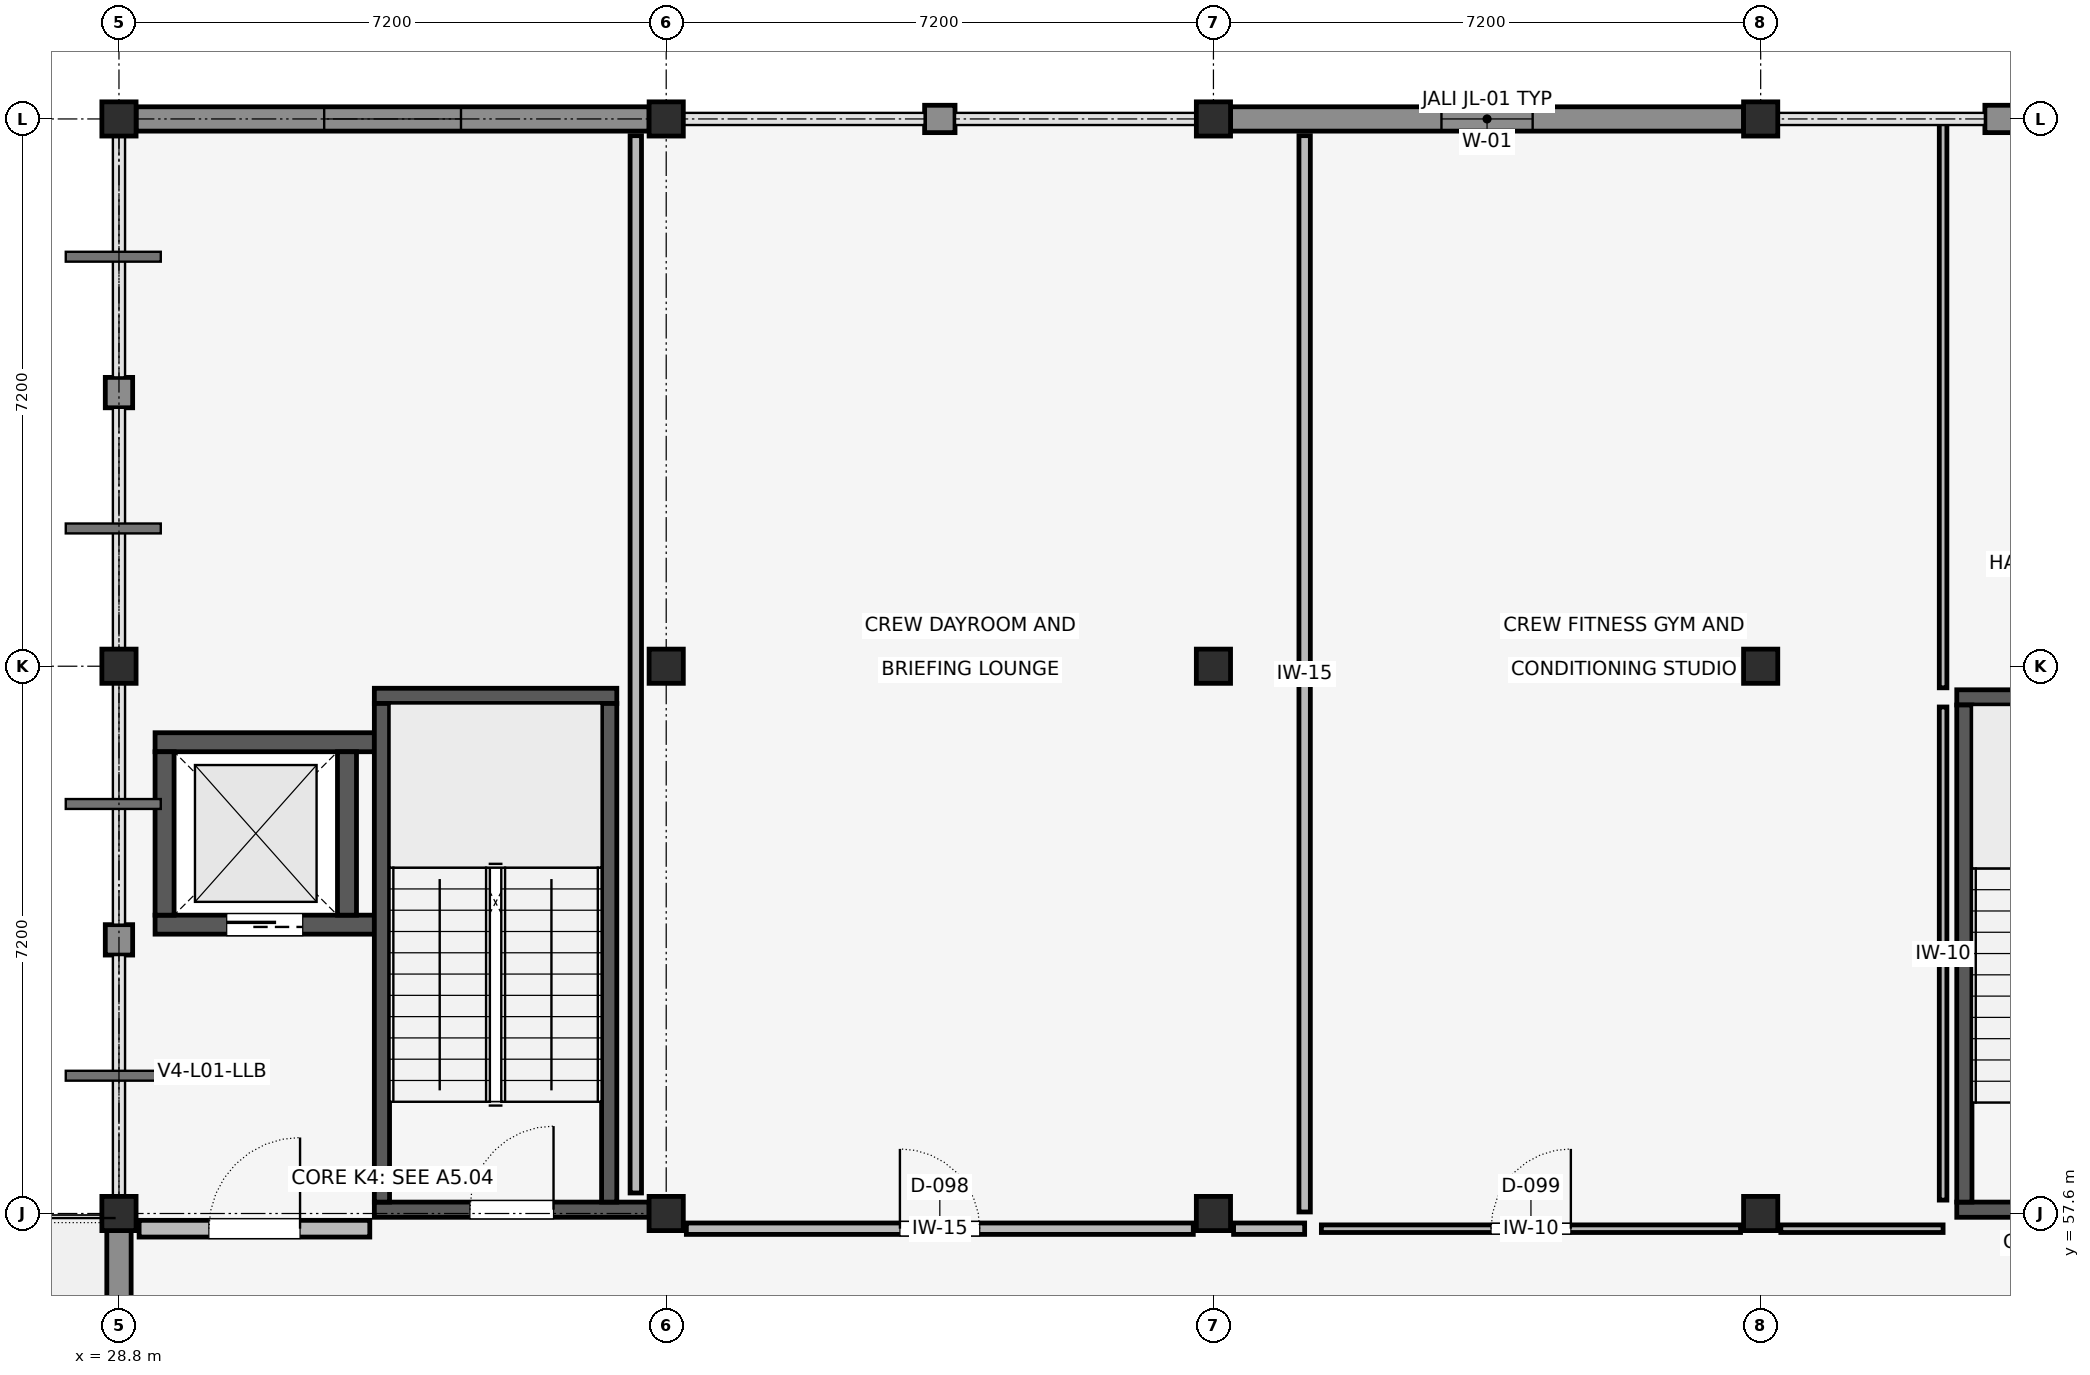
"""IFC4 building model, lengths in metres.
Left out: names, types, materials, properties, quantities, classifications, styles, units other than length and angle.
Written with IfcOpenShell. Run it as: python <this file> out.ifc"""

import sys

from ifc_helpers import new_model, si_unit, direction, frame, frame_2d, origin, origin_2d, place, context, subcontext, project, spatial, rectangle, extrude, element, fill, save


model = new_model("IFC4")
c1 = context("Model", 3, precision=1e-05, world=origin(), true_north=direction((0.0, 1.0)))
c2 = subcontext(c1, "Body", "Model", "MODEL_VIEW")
j1 = project(units=[si_unit("LENGTHUNIT", "METRE"), si_unit("PLANEANGLEUNIT", "RADIAN")], contexts=[c1])
p1 = place(None, origin())
s1 = spatial("IfcSite", under=j1, at=p1, CompositionType="ELEMENT")
p2 = place(p1, origin())
s2 = spatial("IfcBuilding", under=s1, at=p2, CompositionType="ELEMENT")
p3 = place(p2, frame((0.0, 0.0, 5.4)))
s3 = spatial("IfcBuildingStorey", under=s2, at=p3, CompositionType="ELEMENT", Elevation=5.4)
for number, where, z_axis, x_axis in (
    (1, (28.8, 57.6, 0.0), (0.0, 0.0, 1.0), (1.0, 0.0, 0.0)),
    (2, (28.8, 64.8, 0.0), (0.0, 0.0, 1.0), (1.0, 0.0, 0.0)),
    (3, (28.8, 72.0, 0.0), (0.0, 0.0, 1.0), (1.0, 0.0, 0.0)),
    (4, (36.0, 57.6, 0.0), (0.0, 0.0, 1.0), (1.0, 0.0, 0.0)),
    (5, (36.0, 64.8, 0.0), (0.0, 0.0, 1.0), (1.0, 0.0, 0.0)),
    (6, (36.0, 72.0, 0.0), (0.0, 0.0, 1.0), (1.0, 0.0, 0.0)),
    (7, (43.2, 57.6, 0.0), (0.0, 0.0, 1.0), (1.0, 0.0, 0.0)),
    (8, (43.2, 64.8, 0.0), (0.0, 0.0, 1.0), (1.0, 0.0, 0.0)),
    (9, (43.2, 72.0, 0.0), (0.0, 0.0, 1.0), (1.0, 0.0, 0.0)),
    (10, (50.4, 57.6, 0.0), (0.0, 0.0, 1.0), (1.0, 0.0, 0.0)),
    (11, (50.4, 64.8, 0.0), (0.0, 0.0, 1.0), (1.0, 0.0, 0.0)),
    (12, (50.4, 72.0, 0.0), (0.0, 0.0, 1.0), (1.0, 0.0, 0.0)),
):
    element("IfcColumn", number, at=place(p3, frame(where, z_axis=z_axis, x_axis=x_axis)), inside=s3, PredefinedType="COLUMN", context=c2, shape_type="SweptSolid", body=[
        extrude(rectangle(XDim=0.45, YDim=0.45, at=origin_2d()), origin(), (0.0, 0.0, 1.0), 4.2),
    ])
p4 = place(p3, frame((29.275, 61.4, 0.0), z_axis=(0.0, 0.0, 1.0), x_axis=(1.0, 0.0, 0.0)))
e13 = element("IfcWall", 13, at=p4, inside=s3, PredefinedType="SHEAR", context=c2, shape_type="SweptSolid", body=[
    extrude(rectangle(XDim=2.885, YDim=0.25, at=frame_2d((1.442, 0.0))), origin(), (0.0, 0.0, 1.0), 3.95),
])
p5 = place(p4, frame((0.942, 0.0, 0.0)))
e14 = element("IfcOpeningElement", 14, at=p5, cuts=e13, PredefinedType="OPENING", context=c2, shape_type="SweptSolid", body=[
    extrude(rectangle(XDim=1.0, YDim=2.1, at=frame_2d((0.5, 1.05))), frame((0.0, 0.137, 0.0), z_axis=(0.0, -1.0, 0.0), x_axis=(1.0, 0.0, 0.0)), (0.0, 0.0, 1.0), 0.274),
])
p6 = place(p3, frame((29.275, 63.8, 0.0), z_axis=(0.0, 0.0, 1.0), x_axis=(1.0, 0.0, 0.0)))
e15 = element("IfcWall", 15, at=p6, inside=s3, PredefinedType="SHEAR", context=c2, shape_type="SweptSolid", body=[
    extrude(rectangle(XDim=2.885, YDim=0.25, at=frame_2d((1.442, 0.0))), origin(), (0.0, 0.0, 1.0), 3.95),
])
for number, where, z_axis, x_axis in (
    (16, (29.4, 61.525, 0.0), (0.0, 0.0, 1.0), (0.0, 1.0, 0.0)),
    (17, (31.8, 61.525, 0.0), (0.0, 0.0, 1.0), (0.0, 1.0, 0.0)),
):
    element("IfcWall", number, at=place(p3, frame(where, z_axis=z_axis, x_axis=x_axis)), inside=s3, PredefinedType="SHEAR", context=c2, shape_type="SweptSolid", body=[
        extrude(rectangle(XDim=2.15, YDim=0.25, at=frame_2d((1.075, 0.0))), origin(), (0.0, 0.0, 1.0), 3.95),
    ])
p7 = place(p3, frame((32.16, 57.65, 0.0), z_axis=(0.0, 0.0, 1.0), x_axis=(1.0, 0.0, 0.0)))
e18 = element("IfcWall", 18, at=p7, inside=s3, PredefinedType="SHEAR", context=c2, shape_type="SweptSolid", body=[
    extrude(rectangle(XDim=3.615, YDim=0.2, at=frame_2d((1.808, 0.0))), origin(), (0.0, 0.0, 1.0), 3.95),
])
p8 = place(p7, frame((1.258, 0.0, 0.0)))
e19 = element("IfcOpeningElement", 19, at=p8, cuts=e18, PredefinedType="OPENING", context=c2, shape_type="SweptSolid", body=[
    extrude(rectangle(XDim=1.1, YDim=2.15, at=frame_2d((0.55, 1.075))), frame((0.0, 0.112, 0.0), z_axis=(0.0, -1.0, 0.0), x_axis=(1.0, 0.0, 0.0)), (0.0, 0.0, 1.0), 0.224),
])
p9 = place(p3, frame((32.16, 64.41, 0.0), z_axis=(0.0, 0.0, 1.0), x_axis=(1.0, 0.0, 0.0)))
e20 = element("IfcWall", 20, at=p9, inside=s3, PredefinedType="SHEAR", context=c2, shape_type="SweptSolid", body=[
    extrude(rectangle(XDim=3.19, YDim=0.2, at=frame_2d((1.595, 0.0))), origin(), (0.0, 0.0, 1.0), 3.95),
])
for number, where, z_axis, x_axis in (
    (21, (32.26, 57.75, 0.0), (0.0, 0.0, 1.0), (0.0, 1.0, 0.0)),
    (22, (35.25, 57.75, 0.0), (0.0, 0.0, 1.0), (0.0, 1.0, 0.0)),
):
    element("IfcWall", number, at=place(p3, frame(where, z_axis=z_axis, x_axis=x_axis)), inside=s3, PredefinedType="SHEAR", context=c2, shape_type="SweptSolid", body=[
        extrude(rectangle(XDim=6.56, YDim=0.2, at=frame_2d((3.28, 0.0))), origin(), (0.0, 0.0, 1.0), 3.95),
    ])
p10 = place(p3, frame((52.98, 57.65, 0.0), z_axis=(0.0, 0.0, 1.0), x_axis=(1.0, 0.0, 0.0)))
e23 = element("IfcWall", 23, at=p10, inside=s3, PredefinedType="SHEAR", context=c2, shape_type="SweptSolid", body=[
    extrude(rectangle(XDim=3.495, YDim=0.2, at=frame_2d((1.748, 0.0))), origin(), (0.0, 0.0, 1.0), 3.95),
])
p11 = place(p10, frame((1.198, 0.0, 0.0)))
e24 = element("IfcOpeningElement", 24, at=p11, cuts=e23, PredefinedType="OPENING", context=c2, shape_type="SweptSolid", body=[
    extrude(rectangle(XDim=1.1, YDim=2.15, at=frame_2d((0.55, 1.075))), frame((0.0, 0.112, 0.0), z_axis=(0.0, -1.0, 0.0), x_axis=(1.0, 0.0, 0.0)), (0.0, 0.0, 1.0), 0.224),
])
p12 = place(p3, frame((52.98, 64.39, 0.0), z_axis=(0.0, 0.0, 1.0), x_axis=(1.0, 0.0, 0.0)))
e25 = element("IfcWall", 25, at=p12, inside=s3, PredefinedType="SHEAR", context=c2, shape_type="SweptSolid", body=[
    extrude(rectangle(XDim=3.17, YDim=0.2, at=frame_2d((1.585, 0.0))), origin(), (0.0, 0.0, 1.0), 3.95),
])
p13 = place(p3, frame((53.08, 57.75, 0.0), z_axis=(0.0, 0.0, 1.0), x_axis=(0.0, 1.0, 0.0)))
e26 = element("IfcWall", 26, at=p13, inside=s3, PredefinedType="SHEAR", context=c2, shape_type="SweptSolid", body=[
    extrude(rectangle(XDim=6.54, YDim=0.2, at=frame_2d((3.27, 0.0))), origin(), (0.0, 0.0, 1.0), 3.95),
])
p14 = place(p3, frame((53.75, 72.0, 0.0), z_axis=(0.0, 0.0, 1.0), x_axis=(-1.0, 0.0, 0.0)))
e27 = element("IfcWall", 27, at=p14, inside=s3, PredefinedType="SOLIDWALL", context=c2, shape_type="SweptSolid", body=[
    extrude(rectangle(XDim=0.4, YDim=0.36, at=frame_2d((0.2, 0.0))), origin(), (0.0, 0.0, 1.0), 3.29),
])
p15 = place(p3, frame((50.175, 72.0, 0.0), z_axis=(0.0, 0.0, 1.0), x_axis=(-1.0, 0.0, 0.0)))
e28 = element("IfcWall", 28, at=p15, inside=s3, PredefinedType="ELEMENTEDWALL", context=c2, shape_type="SweptSolid", body=[
    extrude(rectangle(XDim=6.75, YDim=0.32, at=frame_2d((3.375, 0.0))), origin(), (0.0, 0.0, 1.0), 3.29),
])
p16 = place(p15, frame((2.775, 0.0, 0.85)))
e29 = element("IfcOpeningElement", 29, at=p16, cuts=e28, PredefinedType="OPENING", context=c2, shape_type="SweptSolid", body=[
    extrude(rectangle(XDim=1.2, YDim=2.2, at=frame_2d((0.6, 1.1))), frame((0.0, 0.172, 0.0), z_axis=(0.0, -1.0, 0.0), x_axis=(1.0, 0.0, 0.0)), (0.0, 0.0, 1.0), 0.344),
])
p17 = place(p3, frame((39.8, 72.0, 0.0), z_axis=(0.0, 0.0, 1.0), x_axis=(-1.0, 0.0, 0.0)))
e30 = element("IfcWall", 30, at=p17, inside=s3, PredefinedType="SOLIDWALL", context=c2, shape_type="SweptSolid", body=[
    extrude(rectangle(XDim=0.4, YDim=0.36, at=frame_2d((0.2, 0.0))), origin(), (0.0, 0.0, 1.0), 3.29),
])
p18 = place(p3, frame((35.775, 72.0, 0.0), z_axis=(0.0, 0.0, 1.0), x_axis=(-1.0, 0.0, 0.0)))
e31 = element("IfcWall", 31, at=p18, inside=s3, PredefinedType="ELEMENTEDWALL", context=c2, shape_type="SweptSolid", body=[
    extrude(rectangle(XDim=6.75, YDim=0.32, at=frame_2d((3.375, 0.0))), origin(), (0.0, 0.0, 1.0), 3.29),
])
p19 = place(p18, frame((2.475, 0.0, 0.85)))
e32 = element("IfcOpeningElement", 32, at=p19, cuts=e31, PredefinedType="OPENING", context=c2, shape_type="SweptSolid", body=[
    extrude(rectangle(XDim=1.8, YDim=2.2, at=frame_2d((0.9, 1.1))), frame((0.0, 0.172, 0.0), z_axis=(0.0, -1.0, 0.0), x_axis=(1.0, 0.0, 0.0)), (0.0, 0.0, 1.0), 0.344),
])
p20 = place(p3, frame((28.8, 68.6, 0.0), z_axis=(0.0, 0.0, 1.0), x_axis=(0.0, -1.0, 0.0)))
e33 = element("IfcWall", 33, at=p20, inside=s3, PredefinedType="SOLIDWALL", context=c2, shape_type="SweptSolid", body=[
    extrude(rectangle(XDim=0.4, YDim=0.36, at=frame_2d((0.2, 0.0))), origin(), (0.0, 0.0, 1.0), 3.29),
])
p21 = place(p3, frame((28.8, 61.4, 0.0), z_axis=(0.0, 0.0, 1.0), x_axis=(0.0, -1.0, 0.0)))
e34 = element("IfcWall", 34, at=p21, inside=s3, PredefinedType="SOLIDWALL", context=c2, shape_type="SweptSolid", body=[
    extrude(rectangle(XDim=0.4, YDim=0.36, at=frame_2d((0.2, 0.0))), origin(), (0.0, 0.0, 1.0), 3.34),
])
p22 = place(p3, frame((28.8, 57.375, 0.0), z_axis=(0.0, 0.0, 1.0), x_axis=(0.0, -1.0, 0.0)))
e35 = element("IfcWall", 35, at=p22, inside=s3, PredefinedType="ELEMENTEDWALL", context=c2, shape_type="SweptSolid", body=[
    extrude(rectangle(XDim=6.75, YDim=0.32, at=frame_2d((3.375, 0.0))), origin(), (0.0, 0.0, 1.0), 3.29),
])
p23 = place(p22, frame((4.515, 0.0, 0.0)))
e36 = element("IfcOpeningElement", 36, at=p23, cuts=e35, PredefinedType="OPENING", context=c2, shape_type="SweptSolid", body=[
    extrude(rectangle(XDim=1.5, YDim=2.2, at=frame_2d((0.75, 1.1))), frame((0.0, 0.172, 0.0), z_axis=(0.0, -1.0, 0.0), x_axis=(1.0, 0.0, 0.0)), (0.0, 0.0, 1.0), 0.344),
])
p24 = place(p3, frame((29.065, 57.4, 0.0), z_axis=(0.0, 0.0, 1.0), x_axis=(1.0, 0.0, 0.0)))
e37 = element("IfcWall", 37, at=p24, inside=s3, PredefinedType="STANDARD", context=c2, shape_type="SweptSolid", body=[
    extrude(rectangle(XDim=3.035, YDim=0.22, at=frame_2d((1.518, 0.0))), origin(), (0.0, 0.0, 1.0), 3.92),
])
p25 = place(p24, frame((0.917, 0.0, 0.0)))
e38 = element("IfcOpeningElement", 38, at=p25, cuts=e37, PredefinedType="OPENING", context=c2, shape_type="SweptSolid", body=[
    extrude(rectangle(XDim=1.2, YDim=2.2, at=frame_2d((0.6, 1.1))), frame((0.0, 0.122, 0.0), z_axis=(0.0, -1.0, 0.0), x_axis=(1.0, 0.0, 0.0)), (0.0, 0.0, 1.0), 0.244),
])
p26 = place(p3, frame((36.265, 57.4, 0.0), z_axis=(0.0, 0.0, 1.0), x_axis=(1.0, 0.0, 0.0)))
e39 = element("IfcWall", 39, at=p26, inside=s3, PredefinedType="STANDARD", context=c2, shape_type="SweptSolid", body=[
    extrude(rectangle(XDim=6.67, YDim=0.15, at=frame_2d((3.335, 0.0))), origin(), (0.0, 0.0, 1.0), 3.238),
])
p27 = place(p26, frame((2.81, 0.0, 0.0)))
e40 = element("IfcOpeningElement", 40, at=p27, cuts=e39, PredefinedType="OPENING", context=c2, shape_type="SweptSolid", body=[
    extrude(rectangle(XDim=1.05, YDim=2.15, at=frame_2d((0.525, 1.075))), frame((0.0, 0.087, 0.0), z_axis=(0.0, -1.0, 0.0), x_axis=(1.0, 0.0, 0.0)), (0.0, 0.0, 1.0), 0.174),
])
p28 = place(p3, frame((43.465, 57.4, 0.0), z_axis=(0.0, 0.0, 1.0), x_axis=(1.0, 0.0, 0.0)))
e41 = element("IfcWall", 41, at=p28, inside=s3, PredefinedType="STANDARD", context=c2, shape_type="SweptSolid", body=[
    extrude(rectangle(XDim=0.935, YDim=0.15, at=frame_2d((0.467, 0.0))), origin(), (0.0, 0.0, 1.0), 3.188),
])
p29 = place(p3, frame((44.4, 57.62, 0.0), z_axis=(0.0, 0.0, 1.0), x_axis=(0.0, 1.0, 0.0)))
e42 = element("IfcWall", 42, at=p29, inside=s3, PredefinedType="STANDARD", context=c2, shape_type="SweptSolid", body=[
    extrude(rectangle(XDim=14.16, YDim=0.15, at=frame_2d((7.08, 0.0))), origin(), (0.0, 0.0, 1.0), 3.188),
])
p30 = place(p3, frame((35.6, 57.87, 0.0), z_axis=(0.0, 0.0, 1.0), x_axis=(0.0, 1.0, 0.0)))
e43 = element("IfcWall", 43, at=p30, inside=s3, PredefinedType="STANDARD", context=c2, shape_type="SweptSolid", body=[
    extrude(rectangle(XDim=13.91, YDim=0.15, at=frame_2d((6.955, 0.0))), origin(), (0.0, 0.0, 1.0), 3.238),
])
p31 = place(p3, frame((44.62, 57.4, 0.0), z_axis=(0.0, 0.0, 1.0), x_axis=(1.0, 0.0, 0.0)))
e44 = element("IfcWall", 44, at=p31, inside=s3, PredefinedType="PARTITIONING", context=c2, shape_type="SweptSolid", body=[
    extrude(rectangle(XDim=5.515, YDim=0.1, at=frame_2d((2.757, 0.0))), origin(), (0.0, 0.0, 1.0), 3.188),
])
p32 = place(p31, frame((2.232, 0.0, 0.0)))
e45 = element("IfcOpeningElement", 45, at=p32, cuts=e44, PredefinedType="OPENING", context=c2, shape_type="SweptSolid", body=[
    extrude(rectangle(XDim=1.05, YDim=2.15, at=frame_2d((0.525, 1.075))), frame((0.0, 0.062, 0.0), z_axis=(0.0, -1.0, 0.0), x_axis=(1.0, 0.0, 0.0)), (0.0, 0.0, 1.0), 0.124),
])
p33 = place(p3, frame((50.665, 57.4, 0.0), z_axis=(0.0, 0.0, 1.0), x_axis=(1.0, 0.0, 0.0)))
e46 = element("IfcWall", 46, at=p33, inside=s3, PredefinedType="PARTITIONING", context=c2, shape_type="SweptSolid", body=[
    extrude(rectangle(XDim=2.135, YDim=0.1, at=frame_2d((1.067, 0.0))), origin(), (0.0, 0.0, 1.0), 3.92),
])
p34 = place(p3, frame((52.8, 57.776, 0.0), z_axis=(0.0, 0.0, 1.0), x_axis=(0.0, 1.0, 0.0)))
e47 = element("IfcWall", 47, at=p34, inside=s3, PredefinedType="PARTITIONING", context=c2, shape_type="SweptSolid", body=[
    extrude(rectangle(XDim=6.488, YDim=0.1, at=frame_2d((3.244, 0.0))), origin(), (0.0, 0.0, 1.0), 3.92),
])
p35 = place(p3, frame((52.8, 64.516, 0.0), z_axis=(0.0, 0.0, 1.0), x_axis=(0.0, 1.0, 0.0)))
e48 = element("IfcWall", 48, at=p35, inside=s3, PredefinedType="PARTITIONING", context=c2, shape_type="SweptSolid", body=[
    extrude(rectangle(XDim=7.484, YDim=0.1, at=frame_2d((3.742, 0.0))), origin(), (0.0, 0.0, 1.0), 3.188),
])
p36 = place(p16, origin())
e49 = element("IfcWindow", 49, at=p36, inside=s3, PartitioningType="SINGLE_PANEL", PredefinedType="WINDOW", context=c2, shape_type="SweptSolid", body=[
    extrude(rectangle(XDim=1.2, YDim=2.2, at=frame_2d((0.6, 1.1))), frame((0.0, 0.03, 0.0), z_axis=(0.0, -1.0, 0.0), x_axis=(1.0, 0.0, 0.0)), (0.0, 0.0, 1.0), 0.06),
])
fill(e29, e49)
p37 = place(p19, origin())
e50 = element("IfcWindow", 50, at=p37, inside=s3, PartitioningType="SINGLE_PANEL", PredefinedType="WINDOW", context=c2, shape_type="SweptSolid", body=[
    extrude(rectangle(XDim=1.8, YDim=2.2, at=frame_2d((0.9, 1.1))), frame((0.0, 0.03, 0.0), z_axis=(0.0, -1.0, 0.0), x_axis=(1.0, 0.0, 0.0)), (0.0, 0.0, 1.0), 0.06),
])
fill(e32, e50)
p38 = place(p8, origin())
e51 = element("IfcDoor", 51, at=p38, inside=s3, OperationType="SINGLE_SWING_RIGHT", PredefinedType="DOOR", context=c2, shape_type="SweptSolid", body=[
    extrude(rectangle(XDim=1.1, YDim=2.15, at=frame_2d((0.55, 1.075))), frame((0.0, 0.025, 0.0), z_axis=(0.0, -1.0, 0.0), x_axis=(1.0, 0.0, 0.0)), (0.0, 0.0, 1.0), 0.05),
])
fill(e19, e51)
p39 = place(p5, origin())
e52 = element("IfcDoor", 52, at=p39, inside=s3, OperationType="SLIDING_TO_RIGHT", PredefinedType="DOOR", context=c2, shape_type="SweptSolid", body=[
    extrude(rectangle(XDim=1.0, YDim=2.1, at=frame_2d((0.5, 1.05))), frame((0.0, 0.025, 0.0), z_axis=(0.0, -1.0, 0.0), x_axis=(1.0, 0.0, 0.0)), (0.0, 0.0, 1.0), 0.05),
])
fill(e14, e52)
p40 = place(p25, origin())
e53 = element("IfcDoor", 53, at=p40, inside=s3, OperationType="SINGLE_SWING_RIGHT", PredefinedType="DOOR", context=c2, shape_type="SweptSolid", body=[
    extrude(rectangle(XDim=1.2, YDim=2.2, at=frame_2d((0.6, 1.1))), frame((0.0, 0.025, 0.0), z_axis=(0.0, -1.0, 0.0), x_axis=(1.0, 0.0, 0.0)), (0.0, 0.0, 1.0), 0.05),
])
fill(e38, e53)
p41 = place(p27, origin())
e54 = element("IfcDoor", 54, at=p41, inside=s3, OperationType="SINGLE_SWING_LEFT", PredefinedType="DOOR", context=c2, shape_type="SweptSolid", body=[
    extrude(rectangle(XDim=1.05, YDim=2.15, at=frame_2d((0.525, 1.075))), frame((0.0, 0.025, 0.0), z_axis=(0.0, -1.0, 0.0), x_axis=(1.0, 0.0, 0.0)), (0.0, 0.0, 1.0), 0.05),
])
fill(e40, e54)
p42 = place(p32, origin())
e55 = element("IfcDoor", 55, at=p42, inside=s3, OperationType="SINGLE_SWING_RIGHT", PredefinedType="DOOR", context=c2, shape_type="SweptSolid", body=[
    extrude(rectangle(XDim=1.05, YDim=2.15, at=frame_2d((0.525, 1.075))), frame((0.0, 0.025, 0.0), z_axis=(0.0, -1.0, 0.0), x_axis=(1.0, 0.0, 0.0)), (0.0, 0.0, 1.0), 0.05),
])
fill(e45, e55)
save(model, sys.argv[1])
